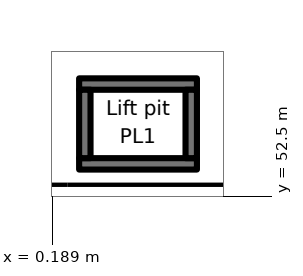
"""IFC4 building model, lengths in metres.
Left out: names, types, materials, properties, quantities, classifications, styles, units other than length and angle.
Written with IfcOpenShell. Run it as: python <this file> out.ifc"""

import sys

from ifc_helpers import new_model, si_unit, direction, frame, frame_2d, origin, place, context, subcontext, project, spatial, rectangle, extrude, element, save


model = new_model("IFC4")
c1 = context("Model", 3, precision=1e-05, world=origin(), true_north=direction((0.0, 1.0)))
c2 = subcontext(c1, "Body", "Model", "MODEL_VIEW")
j1 = project(units=[si_unit("LENGTHUNIT", "METRE"), si_unit("PLANEANGLEUNIT", "RADIAN")], contexts=[c1])
p1 = place(None, origin())
s1 = spatial("IfcSite", under=j1, at=p1, CompositionType="ELEMENT")
p2 = place(p1, origin())
s2 = spatial("IfcBuilding", under=s1, at=p2, CompositionType="ELEMENT")
p3 = place(p2, origin())
s3 = spatial("IfcBuildingStorey", under=s2, at=p3, CompositionType="ELEMENT", Elevation=0.0)
p4 = place(p3, frame((0.6, 51.6, -6.3), z_axis=(0.0, 0.0, 1.0), x_axis=(1.0, 0.0, 0.0)))
e1 = element("IfcWall", 1, at=p4, inside=s3, PredefinedType="SOLIDWALL", context=c2, shape_type="SweptSolid", body=[
    extrude(rectangle(XDim=7.2, YDim=2.4, at=frame_2d((3.6, 0.0))), origin(), (0.0, 0.0, 1.0), 42.55),
])
p5 = place(p2, frame((0.0, 0.0, -6.0)))
s4 = spatial("IfcBuildingStorey", under=s2, at=p5, CompositionType="ELEMENT", Elevation=-6.0)
for number, where, z_axis, x_axis in (
    (2, (0.9, 53.35, 0.0), (0.0, 0.0, 1.0), (1.0, 0.0, 0.0)),
    (3, (0.9, 55.45, 0.0), (0.0, 0.0, 1.0), (1.0, 0.0, 0.0)),
):
    element("IfcWall", number, at=place(p5, frame(where, z_axis=z_axis, x_axis=x_axis)), inside=s4, PredefinedType="SHEAR", context=c2, shape_type="SweptSolid", body=[
        extrude(rectangle(XDim=3.1, YDim=0.3, at=frame_2d((1.55, 0.0))), origin(), (0.0, 0.0, 1.0), 5.6),
    ])
for number, where, z_axis, x_axis in (
    (4, (1.05, 53.5, 0.0), (0.0, 0.0, 1.0), (0.0, 1.0, 0.0)),
    (5, (3.85, 53.5, 0.0), (0.0, 0.0, 1.0), (0.0, 1.0, 0.0)),
):
    element("IfcWall", number, at=place(p5, frame(where, z_axis=z_axis, x_axis=x_axis)), inside=s4, PredefinedType="SHEAR", context=c2, shape_type="SweptSolid", body=[
        extrude(rectangle(XDim=1.8, YDim=0.3, at=frame_2d((0.9, 0.0))), origin(), (0.0, 0.0, 1.0), 5.6),
    ])
save(model, sys.argv[1])
